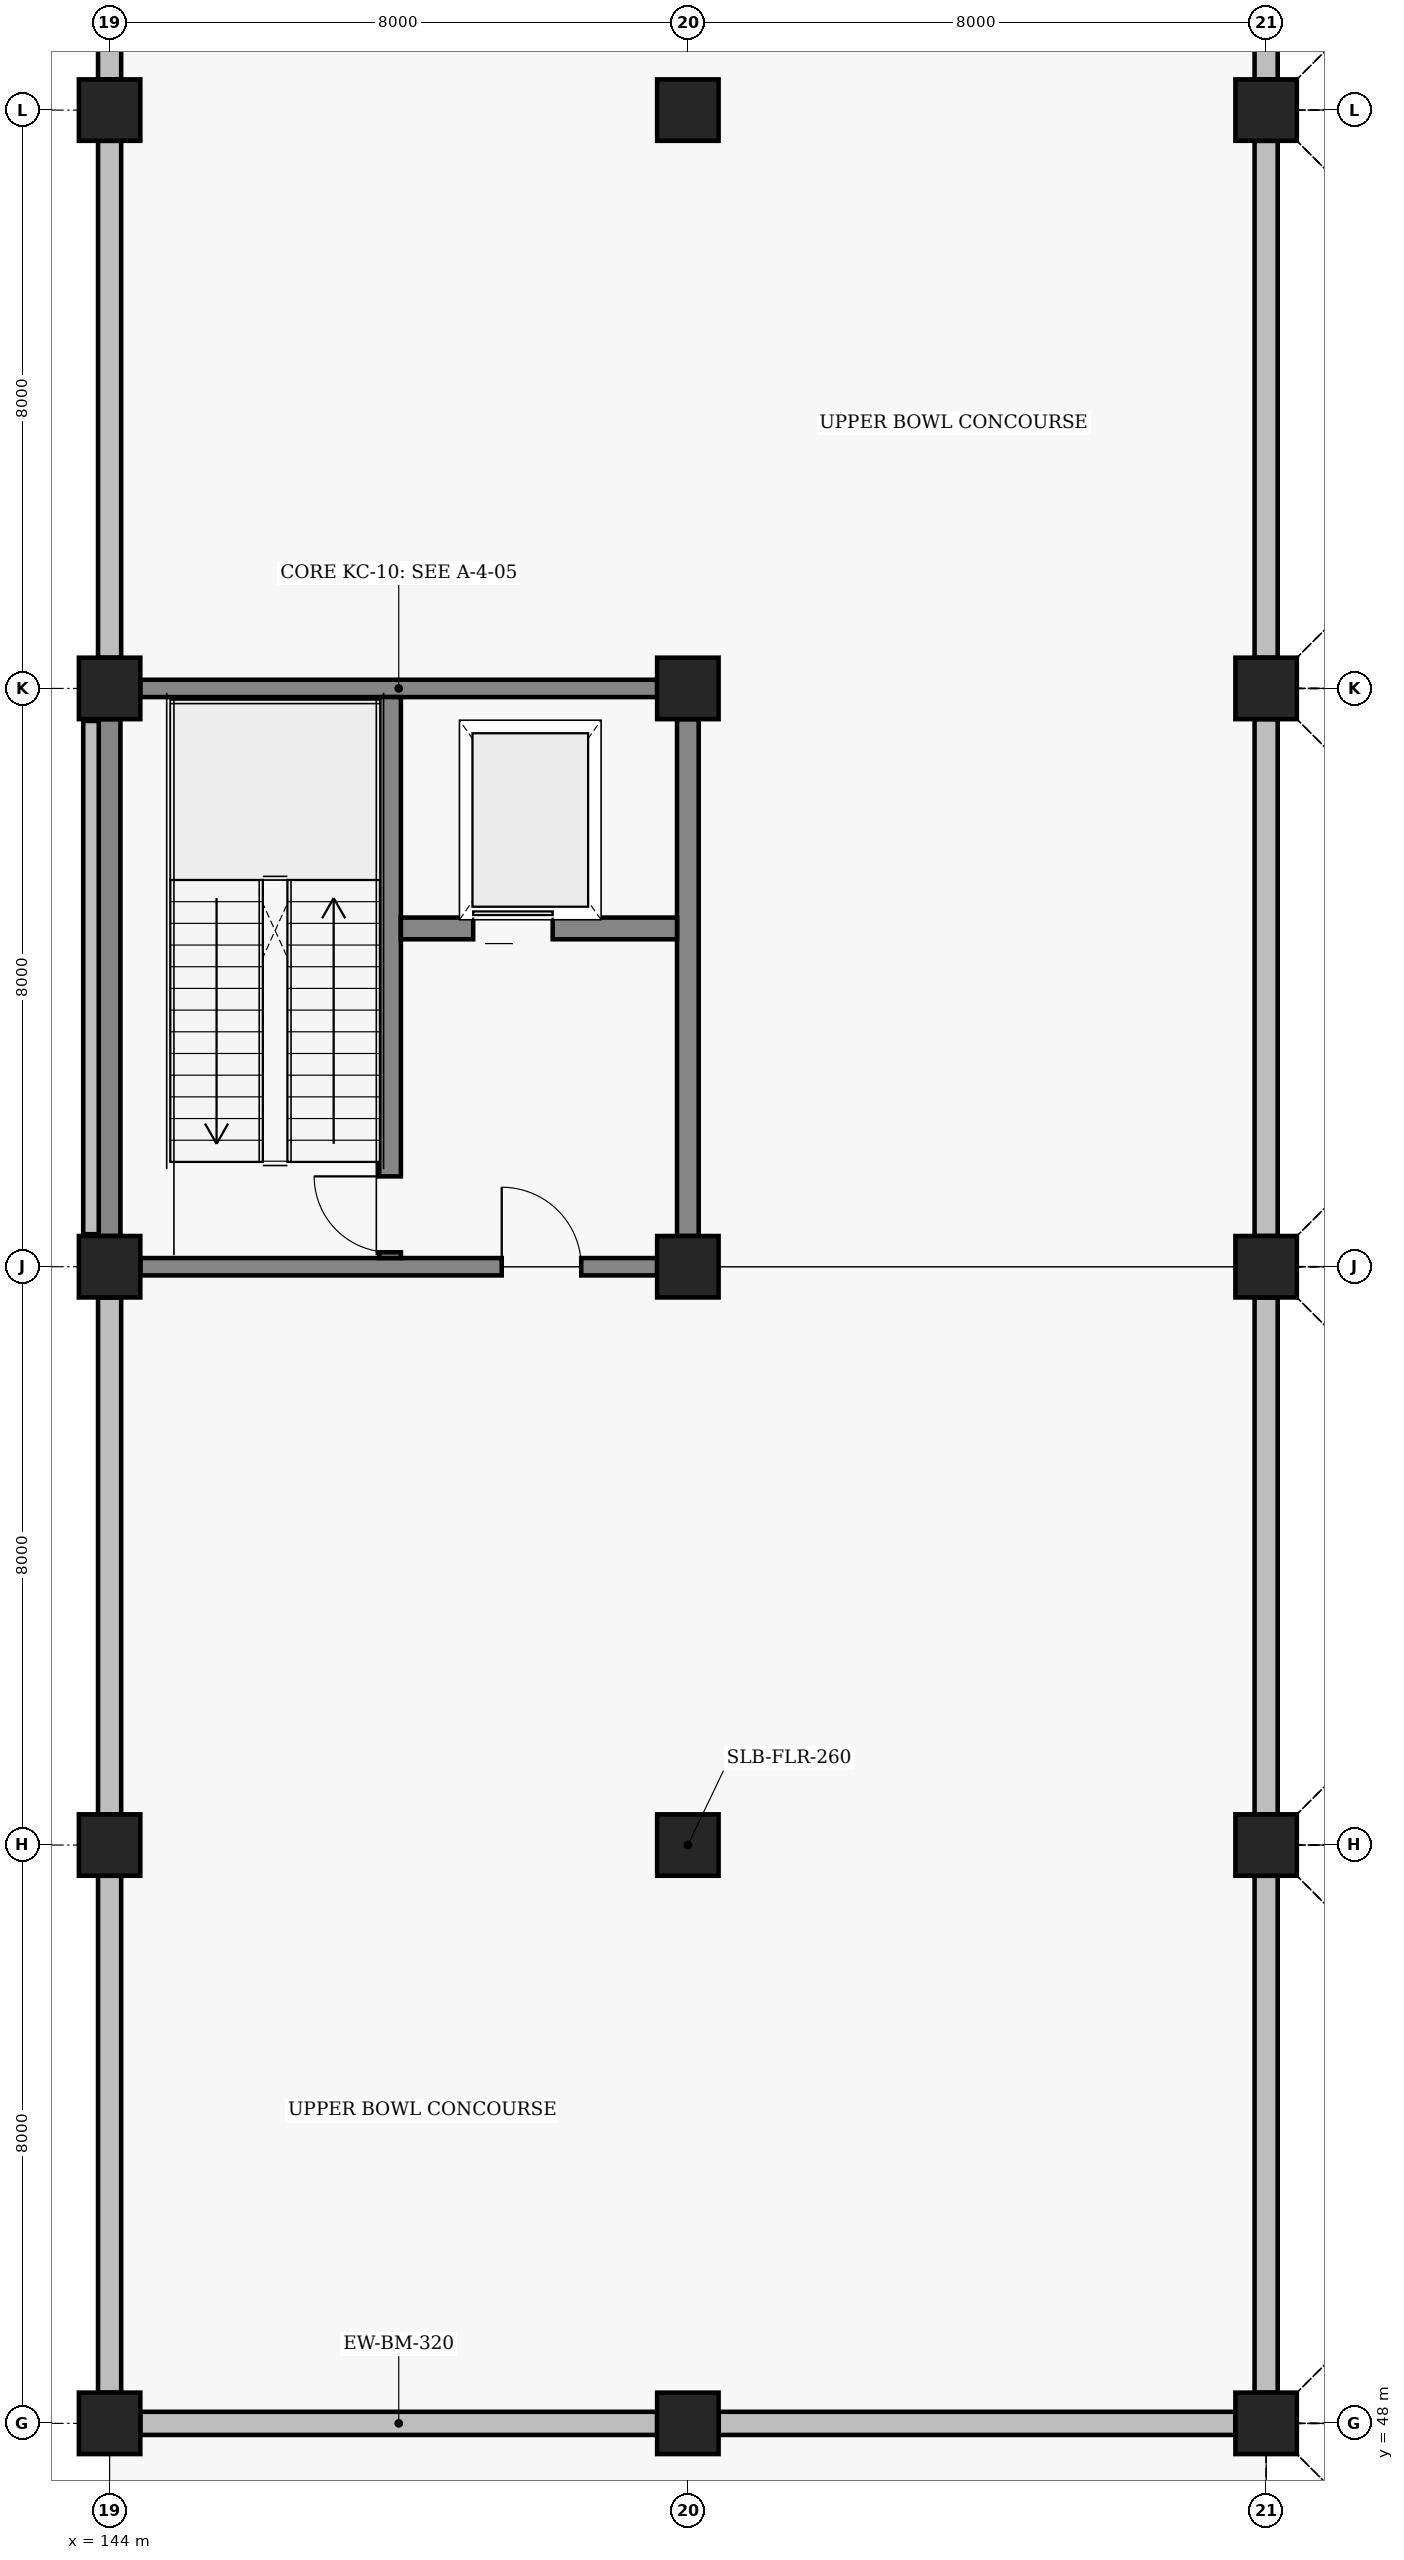
"""IFC4 building model, lengths in metres.
Left out: names, types, materials, properties, quantities, classifications, styles, units other than length and angle.
Written with IfcOpenShell. Run it as: python <this file> out.ifc"""

import sys

from ifc_helpers import new_model, si_unit, direction, frame, frame_2d, origin, origin_2d, place, context, subcontext, project, spatial, rectangle, extrude, element, fill, save


model = new_model("IFC4")
c1 = context("Model", 3, precision=1e-05, world=origin(), true_north=direction((0.0, 1.0)))
c2 = subcontext(c1, "Body", "Model", "MODEL_VIEW")
j1 = project(units=[si_unit("LENGTHUNIT", "METRE"), si_unit("PLANEANGLEUNIT", "RADIAN")], contexts=[c1])
p1 = place(None, origin())
s1 = spatial("IfcSite", under=j1, at=p1, CompositionType="ELEMENT")
p2 = place(p1, origin())
s2 = spatial("IfcBuilding", under=s1, at=p2, CompositionType="ELEMENT")
p3 = place(p2, frame((0.0, 0.0, 18.6)))
s3 = spatial("IfcBuildingStorey", under=s2, at=p3, CompositionType="ELEMENT", Elevation=18.6)
for number, where, z_axis, x_axis in (
    (1, (144.0, 48.0, 0.0), (0.0, 0.0, 1.0), (1.0, 0.0, 0.0)),
    (2, (144.0, 56.0, 0.0), (0.0, 0.0, 1.0), (1.0, 0.0, 0.0)),
    (3, (144.0, 64.0, 0.0), (0.0, 0.0, 1.0), (1.0, 0.0, 0.0)),
    (4, (144.0, 72.0, 0.0), (0.0, 0.0, 1.0), (1.0, 0.0, 0.0)),
    (5, (144.0, 80.0, 0.0), (0.0, 0.0, 1.0), (1.0, 0.0, 0.0)),
    (6, (152.0, 48.0, 0.0), (0.0, 0.0, 1.0), (1.0, 0.0, 0.0)),
    (7, (152.0, 56.0, 0.0), (0.0, 0.0, 1.0), (1.0, 0.0, 0.0)),
    (8, (152.0, 64.0, 0.0), (0.0, 0.0, 1.0), (1.0, 0.0, 0.0)),
    (9, (152.0, 72.0, 0.0), (0.0, 0.0, 1.0), (1.0, 0.0, 0.0)),
    (10, (152.0, 80.0, 0.0), (0.0, 0.0, 1.0), (1.0, 0.0, 0.0)),
    (11, (160.0, 48.0, 0.0), (0.0, 0.0, 1.0), (1.0, 0.0, 0.0)),
    (12, (160.0, 56.0, 0.0), (0.0, 0.0, 1.0), (1.0, 0.0, 0.0)),
    (13, (160.0, 64.0, 0.0), (0.0, 0.0, 1.0), (1.0, 0.0, 0.0)),
    (14, (160.0, 72.0, 0.0), (0.0, 0.0, 1.0), (1.0, 0.0, 0.0)),
    (15, (160.0, 80.0, 0.0), (0.0, 0.0, 1.0), (1.0, 0.0, 0.0)),
):
    element("IfcColumn", number, at=place(p3, frame(where, z_axis=z_axis, x_axis=x_axis)), inside=s3, PredefinedType="COLUMN", context=c2, shape_type="SweptSolid", body=[
        extrude(rectangle(XDim=0.85, YDim=0.85, at=origin_2d()), origin(), (0.0, 0.0, 1.0), 4.2),
    ])
p4 = place(p3, frame((144.425, 48.0, 0.0), z_axis=(0.0, 0.0, 1.0), x_axis=(1.0, 0.0, 0.0)))
e16 = element("IfcWall", 16, at=p4, inside=s3, PredefinedType="SOLIDWALL", context=c2, shape_type="SweptSolid", body=[
    extrude(rectangle(XDim=7.15, YDim=0.32, at=frame_2d((3.575, 0.0))), origin(), (0.0, 0.0, 1.0), 3.35),
])
for number, where, z_axis, x_axis in (
    (17, (144.0, 48.425, 0.0), (0.0, 0.0, 1.0), (0.0, 1.0, 0.0)),
    (18, (144.0, 56.425, 0.0), (0.0, 0.0, 1.0), (0.0, 1.0, 0.0)),
    (19, (144.0, 72.425, 0.0), (0.0, 0.0, 1.0), (0.0, 1.0, 0.0)),
    (20, (144.0, 80.425, 0.0), (0.0, 0.0, 1.0), (0.0, 1.0, 0.0)),
):
    element("IfcWall", number, at=place(p3, frame(where, z_axis=z_axis, x_axis=x_axis)), inside=s3, PredefinedType="SOLIDWALL", context=c2, shape_type="SweptSolid", body=[
        extrude(rectangle(XDim=7.15, YDim=0.32, at=frame_2d((3.575, 0.0))), origin(), (0.0, 0.0, 1.0), 3.34),
    ])
p5 = place(p3, frame((152.425, 48.0, 0.0), z_axis=(0.0, 0.0, 1.0), x_axis=(1.0, 0.0, 0.0)))
e21 = element("IfcWall", 21, at=p5, inside=s3, PredefinedType="SOLIDWALL", context=c2, shape_type="SweptSolid", body=[
    extrude(rectangle(XDim=7.15, YDim=0.32, at=frame_2d((3.575, 0.0))), origin(), (0.0, 0.0, 1.0), 3.35),
])
for number, where, z_axis, x_axis in (
    (22, (160.0, 48.425, 0.0), (0.0, 0.0, 1.0), (0.0, 1.0, 0.0)),
    (23, (160.0, 56.425, 0.0), (0.0, 0.0, 1.0), (0.0, 1.0, 0.0)),
    (24, (160.0, 64.425, 0.0), (0.0, 0.0, 1.0), (0.0, 1.0, 0.0)),
    (25, (160.0, 72.425, 0.0), (0.0, 0.0, 1.0), (0.0, 1.0, 0.0)),
    (26, (160.0, 80.425, 0.0), (0.0, 0.0, 1.0), (0.0, 1.0, 0.0)),
):
    element("IfcWall", number, at=place(p3, frame(where, z_axis=z_axis, x_axis=x_axis)), inside=s3, PredefinedType="SOLIDWALL", context=c2, shape_type="SweptSolid", body=[
        extrude(rectangle(XDim=7.15, YDim=0.32, at=frame_2d((3.575, 0.0))), origin(), (0.0, 0.0, 1.0), 3.34),
    ])
p6 = place(p3, frame((143.76, 64.45, 0.0), z_axis=(0.0, 0.0, 1.0), x_axis=(0.0, 1.0, 0.0)))
e27 = element("IfcWall", 27, at=p6, inside=s3, PredefinedType="PARAPET", context=c2, shape_type="SweptSolid", body=[
    extrude(rectangle(XDim=7.1, YDim=0.25, at=frame_2d((3.55, 0.0))), origin(), (0.0, 0.0, 1.0), 1.2),
])
p7 = place(p3, frame((144.425, 64.0, 0.0), z_axis=(0.0, 0.0, 1.0), x_axis=(1.0, 0.0, 0.0)))
e28 = element("IfcWall", 28, at=p7, inside=s3, PredefinedType="SHEAR", context=c2, shape_type="SweptSolid", body=[
    extrude(rectangle(XDim=7.15, YDim=0.24, at=frame_2d((3.575, 0.0))), origin(), (0.0, 0.0, 1.0), 3.34),
])
p8 = place(p7, frame((5.0, 0.0, 0.0)))
e29 = element("IfcOpeningElement", 29, at=p8, cuts=e28, PredefinedType="OPENING", context=c2, shape_type="SweptSolid", body=[
    extrude(rectangle(XDim=1.1, YDim=2.2, at=frame_2d((0.55, 1.1))), frame((0.0, 0.13, 0.0), z_axis=(0.0, -1.0, 0.0), x_axis=(1.0, 0.0, 0.0)), (0.0, 0.0, 1.0), 0.26),
])
p9 = place(p3, frame((144.425, 72.0, 0.0), z_axis=(0.0, 0.0, 1.0), x_axis=(1.0, 0.0, 0.0)))
e30 = element("IfcWall", 30, at=p9, inside=s3, PredefinedType="SHEAR", context=c2, shape_type="SweptSolid", body=[
    extrude(rectangle(XDim=7.15, YDim=0.24, at=frame_2d((3.575, 0.0))), origin(), (0.0, 0.0, 1.0), 3.34),
])
for number, where, z_axis, x_axis in (
    (31, (144.0, 64.425, 0.0), (0.0, 0.0, 1.0), (0.0, 1.0, 0.0)),
    (32, (152.0, 64.425, 0.0), (0.0, 0.0, 1.0), (0.0, 1.0, 0.0)),
):
    element("IfcWall", number, at=place(p3, frame(where, z_axis=z_axis, x_axis=x_axis)), inside=s3, PredefinedType="SHEAR", context=c2, shape_type="SweptSolid", body=[
        extrude(rectangle(XDim=7.15, YDim=0.3, at=frame_2d((3.575, 0.0))), origin(), (0.0, 0.0, 1.0), 3.34),
    ])
p10 = place(p3, frame((147.88, 64.12, 0.0), z_axis=(0.0, 0.0, 1.0), x_axis=(0.0, 1.0, 0.0)))
e33 = element("IfcWall", 33, at=p10, inside=s3, PredefinedType="SHEAR", context=c2, shape_type="SweptSolid", body=[
    extrude(rectangle(XDim=7.76, YDim=0.3, at=frame_2d((3.88, 0.0))), origin(), (0.0, 0.0, 1.0), 3.44),
])
p11 = place(p10, frame((0.08, 0.0, 0.0)))
e34 = element("IfcOpeningElement", 34, at=p11, cuts=e33, PredefinedType="OPENING", context=c2, shape_type="SweptSolid", body=[
    extrude(rectangle(XDim=1.05, YDim=2.15, at=frame_2d((0.525, 1.075))), frame((0.0, 0.16, 0.0), z_axis=(0.0, -1.0, 0.0), x_axis=(1.0, 0.0, 0.0)), (0.0, 0.0, 1.0), 0.32),
])
p12 = place(p3, frame((148.03, 68.68, 0.0), z_axis=(0.0, 0.0, 1.0), x_axis=(1.0, 0.0, 0.0)))
e35 = element("IfcWall", 35, at=p12, inside=s3, PredefinedType="SHEAR", context=c2, shape_type="SweptSolid", body=[
    extrude(rectangle(XDim=3.82, YDim=0.3, at=frame_2d((1.91, 0.0))), origin(), (0.0, 0.0, 1.0), 3.34),
])
p13 = place(p12, frame((1.0, 0.0, 0.0)))
e36 = element("IfcOpeningElement", 36, at=p13, cuts=e35, PredefinedType="OPENING", context=c2, shape_type="SweptSolid", body=[
    extrude(rectangle(XDim=1.1, YDim=2.15, at=frame_2d((0.55, 1.075))), frame((0.0, 0.16, 0.0), z_axis=(0.0, -1.0, 0.0), x_axis=(1.0, 0.0, 0.0)), (0.0, 0.0, 1.0), 0.32),
])
p14 = place(p8, origin())
e37 = element("IfcDoor", 37, at=p14, inside=s3, OperationType="SINGLE_SWING_LEFT", PredefinedType="DOOR", context=c2, shape_type="SweptSolid", body=[
    extrude(rectangle(XDim=1.1, YDim=2.2, at=frame_2d((0.55, 1.1))), frame((0.0, 0.025, 0.0), z_axis=(0.0, -1.0, 0.0), x_axis=(1.0, 0.0, 0.0)), (0.0, 0.0, 1.0), 0.05),
])
fill(e29, e37)
p15 = place(p11, origin())
e38 = element("IfcDoor", 38, at=p15, inside=s3, OperationType="SINGLE_SWING_RIGHT", PredefinedType="DOOR", context=c2, shape_type="SweptSolid", body=[
    extrude(rectangle(XDim=1.05, YDim=2.15, at=frame_2d((0.525, 1.075))), frame((0.0, 0.025, 0.0), z_axis=(0.0, -1.0, 0.0), x_axis=(1.0, 0.0, 0.0)), (0.0, 0.0, 1.0), 0.05),
])
fill(e34, e38)
p16 = place(p13, origin())
e39 = element("IfcDoor", 39, at=p16, inside=s3, OperationType="SLIDING_TO_LEFT", PredefinedType="DOOR", context=c2, shape_type="SweptSolid", body=[
    extrude(rectangle(XDim=1.1, YDim=2.15, at=frame_2d((0.55, 1.075))), frame((0.0, 0.025, 0.0), z_axis=(0.0, -1.0, 0.0), x_axis=(1.0, 0.0, 0.0)), (0.0, 0.0, 1.0), 0.05),
])
fill(e36, e39)
save(model, sys.argv[1])
